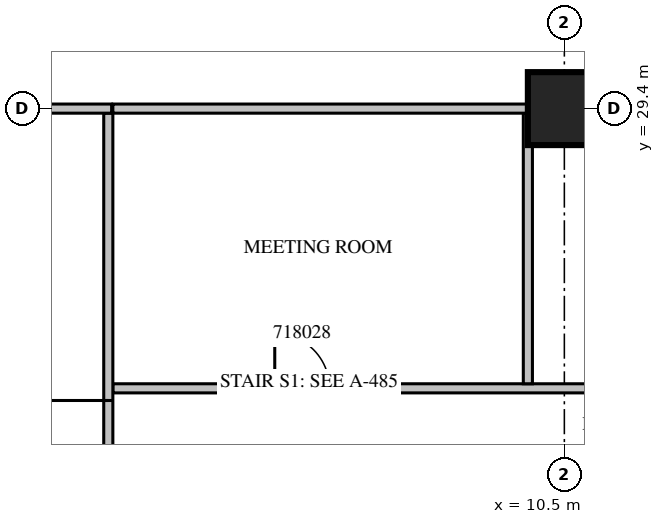
"""IFC4 building model, lengths in metres.
Left out: names, types, materials, properties, quantities, classifications, styles, units other than length and angle.
Written with IfcOpenShell. Run it as: python <this file> out.ifc"""

import sys

from ifc_helpers import new_model, si_unit, direction, frame, frame_2d, origin, origin_2d, place, context, subcontext, project, spatial, rectangle, extrude, source, transform, mapped, element, fill, save


model = new_model("IFC4")
c1 = context("Model", 3, precision=1e-05, world=origin(), true_north=direction((0.0, 1.0)))
c2 = subcontext(c1, "Body", "Model", "MODEL_VIEW")
j1 = project(units=[si_unit("LENGTHUNIT", "METRE"), si_unit("PLANEANGLEUNIT", "RADIAN")], contexts=[c1])
p1 = place(None, origin())
s1 = spatial("IfcSite", under=j1, at=p1, CompositionType="ELEMENT")
p2 = place(p1, origin())
s2 = spatial("IfcBuilding", under=s1, at=p2, CompositionType="ELEMENT")
p3 = place(p2, frame((0.0, 0.0, 86.7)))
s3 = spatial("IfcBuildingStorey", under=s2, at=p3, CompositionType="ELEMENT", Elevation=86.7)
m1 = source(origin(), c2, "Body", "SweptSolid", [
    extrude(rectangle(XDim=1.2, YDim=1.2, at=origin_2d()), origin(), (0.0, 0.0, 1.0), 4.2),
])
p4 = place(p3, frame((10.5, 29.4, 0.0), z_axis=(0.0, 0.0, 1.0), x_axis=(1.0, 0.0, 0.0)))
e1 = element("IfcColumn", 1, at=p4, inside=s3, PredefinedType="COLUMN", context=c2, shape_type="MappedRepresentation", body=[
    mapped(m1, transform((0.0, 0.0, 0.0), scale=1.0)),
])
m2 = source(origin(), c2, "Body", "SweptSolid", [
    extrude(rectangle(XDim=11.625, YDim=0.15, at=frame_2d((5.812, 0.0))), origin(), (0.0, 0.0, 1.0), 3.8),
])
p5 = place(p3, frame((3.075, 24.8, 0.0), z_axis=(0.0, 0.0, 1.0), x_axis=(1.0, 0.0, 0.0)))
e2 = element("IfcWall", 2, at=p5, inside=s3, PredefinedType="PARTITIONING", context=c2, shape_type="MappedRepresentation", body=[
    mapped(m2, transform((0.0, 0.0, 0.0), scale=1.0)),
])
m3 = source(origin(), c2, "Body", "SweptSolid", [
    extrude(rectangle(XDim=0.9, YDim=2.1, at=frame_2d((0.45, 1.05))), frame((0.0, 0.085, 0.0), z_axis=(0.0, -1.0, 0.0), x_axis=(1.0, 0.0, 0.0)), (0.0, 0.0, 1.0), 0.17),
])
p6 = place(p5, frame((2.663, 0.0, 0.0)))
e3 = element("IfcOpeningElement", 3, at=p6, cuts=e2, PredefinedType="OPENING", context=c2, shape_type="MappedRepresentation", body=[
    mapped(m3, transform((0.0, 0.0, 0.0), scale=1.0)),
])
p7 = place(p5, frame((9.35, 0.0, 0.0)))
e4 = element("IfcOpeningElement", 4, at=p7, cuts=e2, PredefinedType="OPENING", context=c2, shape_type="MappedRepresentation", body=[
    mapped(m3, transform((0.0, 0.0, 0.0), scale=1.0)),
])
m4 = source(origin(), c2, "Body", "SweptSolid", [
    extrude(rectangle(XDim=4.45, YDim=0.15, at=frame_2d((2.225, 0.0))), origin(), (0.0, 0.0, 1.0), 3.8),
])
p8 = place(p3, frame((9.9, 24.875, 0.0), z_axis=(0.0, 0.0, 1.0), x_axis=(0.0, 1.0, 0.0)))
e5 = element("IfcWall", 5, at=p8, inside=s3, PredefinedType="PARTITIONING", context=c2, shape_type="MappedRepresentation", body=[
    mapped(m4, transform((0.0, 0.0, 0.0), scale=1.0)),
])
m5 = source(origin(), c2, "Body", "SweptSolid", [
    extrude(rectangle(XDim=6.826, YDim=0.15, at=frame_2d((3.413, 0.0))), origin(), (0.0, 0.0, 1.0), 3.8),
])
p9 = place(p3, frame((9.901, 29.4, 0.0), z_axis=(0.0, 0.0, 1.0), x_axis=(-1.0, 0.0, 0.0)))
e6 = element("IfcWall", 6, at=p9, inside=s3, PredefinedType="PARTITIONING", context=c2, shape_type="MappedRepresentation", body=[
    mapped(m5, transform((0.0, 0.0, 0.0), scale=1.0)),
])
m6 = source(origin(), c2, "Body", "SweptSolid", [
    extrude(rectangle(XDim=7.125, YDim=0.15, at=frame_2d((3.562, 0.0))), origin(), (0.0, 0.0, 1.0), 3.8),
])
p10 = place(p3, frame((3.0, 29.325, 0.0), z_axis=(0.0, 0.0, 1.0), x_axis=(0.0, -1.0, 0.0)))
e7 = element("IfcWall", 7, at=p10, inside=s3, PredefinedType="PARTITIONING", context=c2, shape_type="MappedRepresentation", body=[
    mapped(m6, transform((0.0, 0.0, 0.0), scale=1.0)),
])
m7 = source(origin(), c2, "Body", "SweptSolid", [
    extrude(rectangle(XDim=2.2, YDim=2.1, at=frame_2d((1.1, 1.05))), frame((0.0, 0.085, 0.0), z_axis=(0.0, -1.0, 0.0), x_axis=(1.0, 0.0, 0.0)), (0.0, 0.0, 1.0), 0.17),
])
p11 = place(p10, frame((4.725, 0.0, 0.0)))
e8 = element("IfcOpeningElement", 8, at=p11, cuts=e7, PredefinedType="OPENING", context=c2, shape_type="MappedRepresentation", body=[
    mapped(m7, transform((0.0, 0.0, 0.0), scale=1.0)),
])
m8 = source(origin(), c2, "Body", "SweptSolid", [
    extrude(rectangle(XDim=1.856, YDim=0.15, at=frame_2d((0.928, 0.0))), origin(), (0.0, 0.0, 1.0), 3.8),
])
p12 = place(p3, frame((3.055, 29.4, 0.0), z_axis=(0.0, 0.0, 1.0), x_axis=(-1.0, 0.0, 0.0)))
e9 = element("IfcWall", 9, at=p12, inside=s3, PredefinedType="PARTITIONING", context=c2, shape_type="MappedRepresentation", body=[
    mapped(m8, transform((0.0, 0.0, 0.0), scale=1.0)),
])
m9 = source(origin(), c2, "Body", "SweptSolid", [
    extrude(rectangle(XDim=0.9, YDim=2.1, at=frame_2d((0.45, 1.05))), frame((0.0, 0.025, 0.0), z_axis=(0.0, -1.0, 0.0), x_axis=(1.0, 0.0, 0.0)), (0.0, 0.0, 1.0), 0.05),
])
p13 = place(p6, origin())
e10 = element("IfcDoor", 10, at=p13, inside=s3, OperationType="SINGLE_SWING_LEFT", PredefinedType="DOOR", context=c2, shape_type="MappedRepresentation", body=[
    mapped(m9, transform((0.0, 0.0, 0.0), scale=1.0)),
])
fill(e3, e10)
m10 = source(origin(), c2, "Body", "SweptSolid", [
    extrude(rectangle(XDim=2.2, YDim=2.1, at=frame_2d((1.1, 1.05))), frame((0.0, 0.025, 0.0), z_axis=(0.0, -1.0, 0.0), x_axis=(1.0, 0.0, 0.0)), (0.0, 0.0, 1.0), 0.05),
])
p14 = place(p11, origin())
e11 = element("IfcDoor", 11, at=p14, inside=s3, OperationType="DOUBLE_DOOR_SINGLE_SWING", PredefinedType="DOOR", context=c2, shape_type="MappedRepresentation", body=[
    mapped(m10, transform((0.0, 0.0, 0.0), scale=1.0)),
])
fill(e8, e11)
save(model, sys.argv[1])
